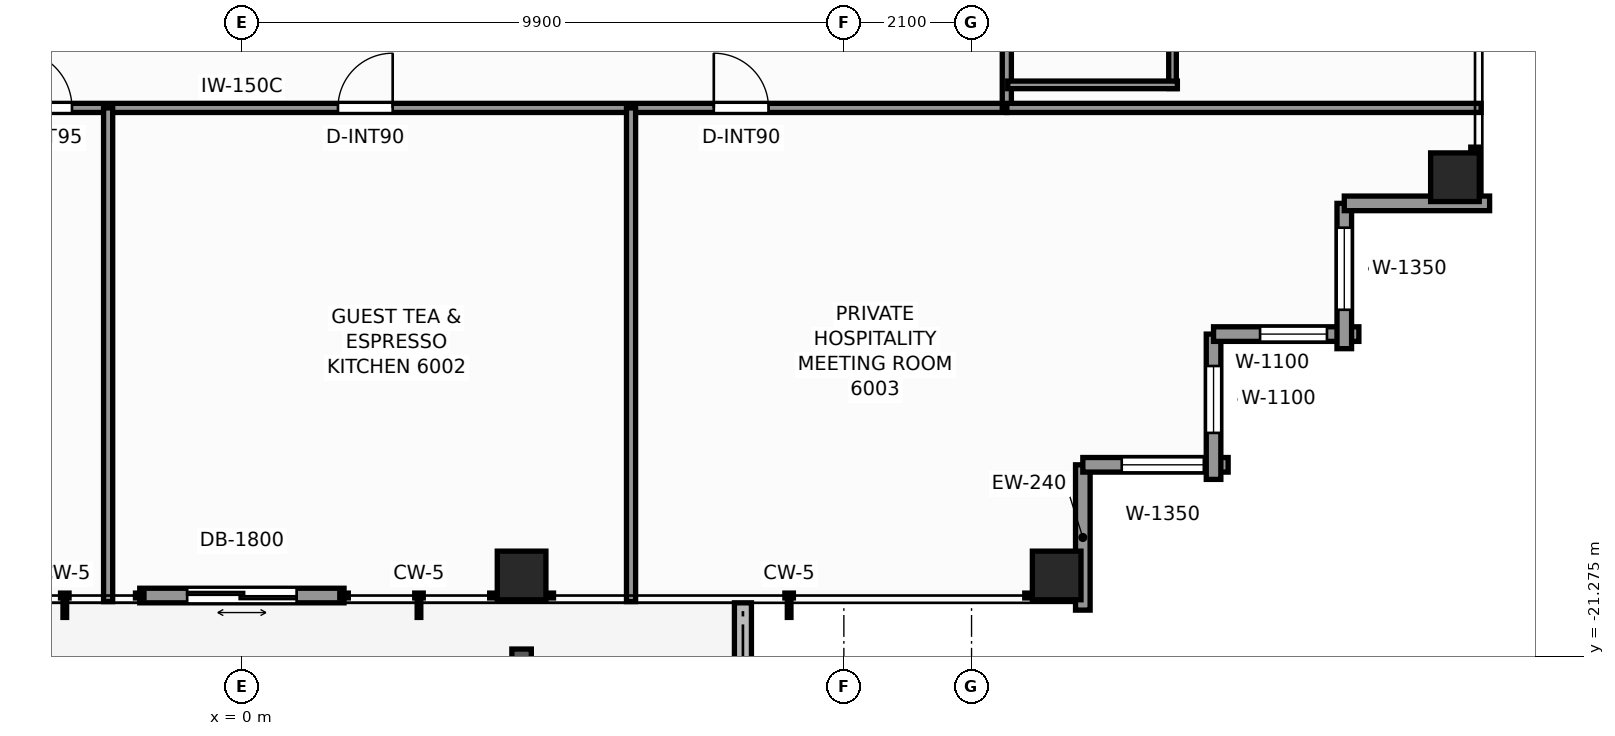
"""IFC4 building model, lengths in metres.
Left out: names, types, materials, properties, quantities, classifications, styles, units other than length and angle.
Written with IfcOpenShell. Run it as: python <this file> out.ifc"""

import sys

from ifc_helpers import new_model, si_unit, direction, frame, frame_2d, origin, origin_2d, place, context, subcontext, project, spatial, rectangle, extrude, element, fill, save


model = new_model("IFC4")
c1 = context("Model", 3, precision=1e-05, world=origin(), true_north=direction((0.0, 1.0)))
c2 = subcontext(c1, "Body", "Model", "MODEL_VIEW")
j1 = project(units=[si_unit("LENGTHUNIT", "METRE"), si_unit("PLANEANGLEUNIT", "RADIAN")], contexts=[c1])
p1 = place(None, origin())
s1 = spatial("IfcSite", under=j1, at=p1, CompositionType="ELEMENT")
p2 = place(p1, origin())
s2 = spatial("IfcBuilding", under=s1, at=p2, CompositionType="ELEMENT")
p3 = place(p2, frame((0.0, 0.0, 206.4)))
s3 = spatial("IfcBuildingStorey", under=s2, at=p3, CompositionType="ELEMENT", Elevation=206.4)
for number, where, z_axis, x_axis in (
    (1, (4.6, -19.95, 0.0), (0.0, 0.0, 1.0), (1.0, 0.0, 0.0)),
    (2, (13.4, -19.95, 0.0), (0.0, 0.0, 1.0), (1.0, 0.0, 0.0)),
    (3, (19.95, -13.4, 0.0), (0.0, 0.0, 1.0), (1.0, 0.0, 0.0)),
):
    element("IfcColumn", number, at=place(p3, frame(where, z_axis=z_axis, x_axis=x_axis)), inside=s3, PredefinedType="COLUMN", context=c2, shape_type="SweptSolid", body=[
        extrude(rectangle(XDim=0.8, YDim=0.8, at=origin_2d()), origin(), (0.0, 0.0, 1.0), 3.3),
    ])
p4 = place(p3, frame((8.24, -23.074, -0.04), z_axis=(0.0, 0.0, 1.0), x_axis=(0.0, 1.0, 0.0)))
e4 = element("IfcWall", 4, at=p4, inside=s3, PredefinedType="PARAPET", context=c2, shape_type="SweptSolid", body=[
    extrude(rectangle(XDim=2.674, YDim=0.28, at=frame_2d((1.337, 0.0))), origin(), (0.0, 0.0, 1.0), 0.42),
])
p5 = place(p3, frame((1.68, -20.28, 0.0), z_axis=(0.0, 0.0, 1.0), x_axis=(-1.0, 0.0, 0.0)))
e5 = element("IfcWall", 5, at=p5, inside=s3, PredefinedType="STANDARD", context=c2, shape_type="SweptSolid", body=[
    extrude(rectangle(XDim=3.36, YDim=0.24, at=frame_2d((1.68, 0.0))), origin(), (0.0, 0.0, 1.0), 3.08),
])
p6 = place(p5, frame((0.78, 0.0, 0.0)))
e6 = element("IfcOpeningElement", 6, at=p6, cuts=e5, PredefinedType="OPENING", context=c2, shape_type="SweptSolid", body=[
    extrude(rectangle(XDim=1.8, YDim=2.2, at=frame_2d((0.9, 1.1))), frame((0.0, 0.13, 0.0), z_axis=(0.0, -1.0, 0.0), x_axis=(1.0, 0.0, 0.0)), (0.0, 0.0, 1.0), 0.26),
])
p7 = place(p3, frame((13.83, -18.13, 0.0), z_axis=(0.0, 0.0, 1.0), x_axis=(0.0, -1.0, 0.0)))
e7 = element("IfcWall", 7, at=p7, inside=s3, PredefinedType="STANDARD", context=c2, shape_type="SweptSolid", body=[
    extrude(rectangle(XDim=2.39, YDim=0.24, at=frame_2d((1.195, 0.0))), origin(), (0.0, 0.0, 1.0), 2.463),
])
p8 = place(p3, frame((16.22, -18.13, 0.0), z_axis=(0.0, 0.0, 1.0), x_axis=(-1.0, 0.0, 0.0)))
e8 = element("IfcWall", 8, at=p8, inside=s3, PredefinedType="STANDARD", context=c2, shape_type="SweptSolid", body=[
    extrude(rectangle(XDim=2.39, YDim=0.24, at=frame_2d((1.195, 0.0))), origin(), (0.0, 0.0, 1.0), 2.463),
])
p9 = place(p8, frame((0.4, 0.0, 0.65)))
e9 = element("IfcOpeningElement", 9, at=p9, cuts=e8, PredefinedType="OPENING", context=c2, shape_type="SweptSolid", body=[
    extrude(rectangle(XDim=1.35, YDim=1.55, at=frame_2d((0.675, 0.775))), frame((0.0, 0.13, 0.0), z_axis=(0.0, -1.0, 0.0), x_axis=(1.0, 0.0, 0.0)), (0.0, 0.0, 1.0), 0.26),
])
p10 = place(p3, frame((15.98, -15.98, 0.0), z_axis=(0.0, 0.0, 1.0), x_axis=(0.0, -1.0, 0.0)))
e10 = element("IfcWall", 10, at=p10, inside=s3, PredefinedType="STANDARD", context=c2, shape_type="SweptSolid", body=[
    extrude(rectangle(XDim=2.39, YDim=0.24, at=frame_2d((1.195, 0.0))), origin(), (0.0, 0.0, 1.0), 2.463),
])
p11 = place(p10, frame((0.525, 0.0, 0.65)))
e11 = element("IfcOpeningElement", 11, at=p11, cuts=e10, PredefinedType="OPENING", context=c2, shape_type="SweptSolid", body=[
    extrude(rectangle(XDim=1.1, YDim=1.45, at=frame_2d((0.55, 0.725))), frame((0.0, 0.13, 0.0), z_axis=(0.0, -1.0, 0.0), x_axis=(1.0, 0.0, 0.0)), (0.0, 0.0, 1.0), 0.26),
])
p12 = place(p3, frame((18.37, -15.98, 0.0), z_axis=(0.0, 0.0, 1.0), x_axis=(-1.0, 0.0, 0.0)))
e12 = element("IfcWall", 12, at=p12, inside=s3, PredefinedType="STANDARD", context=c2, shape_type="SweptSolid", body=[
    extrude(rectangle(XDim=2.39, YDim=0.24, at=frame_2d((1.195, 0.0))), origin(), (0.0, 0.0, 1.0), 2.463),
])
p13 = place(p12, frame((0.525, 0.0, 0.65)))
e13 = element("IfcOpeningElement", 13, at=p13, cuts=e12, PredefinedType="OPENING", context=c2, shape_type="SweptSolid", body=[
    extrude(rectangle(XDim=1.1, YDim=1.45, at=frame_2d((0.55, 0.725))), frame((0.0, 0.13, 0.0), z_axis=(0.0, -1.0, 0.0), x_axis=(1.0, 0.0, 0.0)), (0.0, 0.0, 1.0), 0.26),
])
p14 = place(p3, frame((18.13, -13.83, 0.0), z_axis=(0.0, 0.0, 1.0), x_axis=(0.0, -1.0, 0.0)))
e14 = element("IfcWall", 14, at=p14, inside=s3, PredefinedType="STANDARD", context=c2, shape_type="SweptSolid", body=[
    extrude(rectangle(XDim=2.39, YDim=0.24, at=frame_2d((1.195, 0.0))), origin(), (0.0, 0.0, 1.0), 2.463),
])
p15 = place(p14, frame((0.4, 0.0, 0.65)))
e15 = element("IfcOpeningElement", 15, at=p15, cuts=e14, PredefinedType="OPENING", context=c2, shape_type="SweptSolid", body=[
    extrude(rectangle(XDim=1.35, YDim=1.55, at=frame_2d((0.675, 0.775))), frame((0.0, 0.13, 0.0), z_axis=(0.0, -1.0, 0.0), x_axis=(1.0, 0.0, 0.0)), (0.0, 0.0, 1.0), 0.26),
])
p16 = place(p3, frame((20.52, -13.83, 0.0), z_axis=(0.0, 0.0, 1.0), x_axis=(-1.0, 0.0, 0.0)))
e16 = element("IfcWall", 16, at=p16, inside=s3, PredefinedType="STANDARD", context=c2, shape_type="SweptSolid", body=[
    extrude(rectangle(XDim=2.39, YDim=0.24, at=frame_2d((1.195, 0.0))), origin(), (0.0, 0.0, 1.0), 2.463),
])
p17 = place(p3, frame((-12.58, -12.26, 0.0), z_axis=(0.0, 0.0, 1.0), x_axis=(1.0, 0.0, 0.0)))
e17 = element("IfcWall", 17, at=p17, inside=s3, PredefinedType="PARTITIONING", context=c2, shape_type="SweptSolid", body=[
    extrude(rectangle(XDim=25.16, YDim=0.15, at=frame_2d((12.58, 0.0))), origin(), (0.0, 0.0, 1.0), 2.369),
])
p18 = place(p17, frame((3.657, 0.0, 0.0)))
e18 = element("IfcOpeningElement", 18, at=p18, cuts=e17, PredefinedType="OPENING", context=c2, shape_type="SweptSolid", body=[
    extrude(rectangle(XDim=0.9, YDim=2.06, at=frame_2d((0.45, 1.03))), frame((0.0, 0.085, 0.0), z_axis=(0.0, -1.0, 0.0), x_axis=(1.0, 0.0, 0.0)), (0.0, 0.0, 1.0), 0.17),
])
p19 = place(p17, frame((6.082, 0.0, 0.0)))
e19 = element("IfcOpeningElement", 19, at=p19, cuts=e17, PredefinedType="OPENING", context=c2, shape_type="SweptSolid", body=[
    extrude(rectangle(XDim=0.9, YDim=2.06, at=frame_2d((0.45, 1.03))), frame((0.0, 0.085, 0.0), z_axis=(0.0, -1.0, 0.0), x_axis=(1.0, 0.0, 0.0)), (0.0, 0.0, 1.0), 0.17),
])
p20 = place(p17, frame((8.836, 0.0, 0.0)))
e20 = element("IfcOpeningElement", 20, at=p20, cuts=e17, PredefinedType="OPENING", context=c2, shape_type="SweptSolid", body=[
    extrude(rectangle(XDim=0.95, YDim=2.06, at=frame_2d((0.475, 1.03))), frame((0.0, 0.085, 0.0), z_axis=(0.0, -1.0, 0.0), x_axis=(1.0, 0.0, 0.0)), (0.0, 0.0, 1.0), 0.17),
])
p21 = place(p17, frame((14.16, 0.0, 0.0)))
e21 = element("IfcOpeningElement", 21, at=p21, cuts=e17, PredefinedType="OPENING", context=c2, shape_type="SweptSolid", body=[
    extrude(rectangle(XDim=0.9, YDim=2.06, at=frame_2d((0.45, 1.03))), frame((0.0, 0.085, 0.0), z_axis=(0.0, -1.0, 0.0), x_axis=(1.0, 0.0, 0.0)), (0.0, 0.0, 1.0), 0.17),
])
p22 = place(p17, frame((20.341, 0.0, 0.0)))
e22 = element("IfcOpeningElement", 22, at=p22, cuts=e17, PredefinedType="OPENING", context=c2, shape_type="SweptSolid", body=[
    extrude(rectangle(XDim=0.9, YDim=2.06, at=frame_2d((0.45, 1.03))), frame((0.0, 0.085, 0.0), z_axis=(0.0, -1.0, 0.0), x_axis=(1.0, 0.0, 0.0)), (0.0, 0.0, 1.0), 0.17),
])
p23 = place(p3, frame((12.58, -12.26, 0.0), z_axis=(0.0, 0.0, 1.0), x_axis=(0.0, 1.0, 0.0)))
e23 = element("IfcWall", 23, at=p23, inside=s3, PredefinedType="PARTITIONING", context=c2, shape_type="SweptSolid", body=[
    extrude(rectangle(XDim=24.84, YDim=0.15, at=frame_2d((12.42, 0.0))), origin(), (0.0, 0.0, 1.0), 2.369),
])
p24 = place(p23, frame((3.373, 0.0, 0.0)))
e24 = element("IfcOpeningElement", 24, at=p24, cuts=e23, PredefinedType="OPENING", context=c2, shape_type="SweptSolid", body=[
    extrude(rectangle(XDim=0.95, YDim=2.06, at=frame_2d((0.475, 1.03))), frame((0.0, 0.085, 0.0), z_axis=(0.0, -1.0, 0.0), x_axis=(1.0, 0.0, 0.0)), (0.0, 0.0, 1.0), 0.17),
])
p25 = place(p23, frame((5.538, 0.0, 0.0)))
e25 = element("IfcOpeningElement", 25, at=p25, cuts=e23, PredefinedType="OPENING", context=c2, shape_type="SweptSolid", body=[
    extrude(rectangle(XDim=0.9, YDim=2.06, at=frame_2d((0.45, 1.03))), frame((0.0, 0.085, 0.0), z_axis=(0.0, -1.0, 0.0), x_axis=(1.0, 0.0, 0.0)), (0.0, 0.0, 1.0), 0.17),
])
p26 = place(p23, frame((13.318, 0.0, 0.0)))
e26 = element("IfcOpeningElement", 26, at=p26, cuts=e23, PredefinedType="OPENING", context=c2, shape_type="SweptSolid", body=[
    extrude(rectangle(XDim=0.95, YDim=2.06, at=frame_2d((0.475, 1.03))), frame((0.0, 0.085, 0.0), z_axis=(0.0, -1.0, 0.0), x_axis=(1.0, 0.0, 0.0)), (0.0, 0.0, 1.0), 0.17),
])
p27 = place(p23, frame((17.724, 0.0, 0.0)))
e27 = element("IfcOpeningElement", 27, at=p27, cuts=e23, PredefinedType="OPENING", context=c2, shape_type="SweptSolid", body=[
    extrude(rectangle(XDim=0.9, YDim=2.06, at=frame_2d((0.45, 1.03))), frame((0.0, 0.085, 0.0), z_axis=(0.0, -1.0, 0.0), x_axis=(1.0, 0.0, 0.0)), (0.0, 0.0, 1.0), 0.17),
])
p28 = place(p23, frame((20.0, 0.0, 0.0)))
e28 = element("IfcOpeningElement", 28, at=p28, cuts=e23, PredefinedType="OPENING", context=c2, shape_type="SweptSolid", body=[
    extrude(rectangle(XDim=0.95, YDim=2.06, at=frame_2d((0.475, 1.03))), frame((0.0, 0.085, 0.0), z_axis=(0.0, -1.0, 0.0), x_axis=(1.0, 0.0, 0.0)), (0.0, 0.0, 1.0), 0.17),
])
p29 = place(p3, frame((12.58, -12.26, 0.0), z_axis=(0.0, 0.0, 1.0), x_axis=(1.0, 0.0, 0.0)))
e29 = element("IfcWall", 29, at=p29, inside=s3, PredefinedType="PARTITIONING", context=c2, shape_type="SweptSolid", body=[
    extrude(rectangle(XDim=7.8, YDim=0.15, at=frame_2d((3.9, 0.0))), origin(), (0.0, 0.0, 1.0), 2.369),
])
for number, where, z_axis, x_axis in (
    (30, (-2.2, -20.38, 0.0), (0.0, 0.0, 1.0), (0.0, 1.0, 0.0)),
    (31, (6.4, -20.38, 0.0), (0.0, 0.0, 1.0), (0.0, 1.0, 0.0)),
):
    element("IfcWall", number, at=place(p3, frame(where, z_axis=z_axis, x_axis=x_axis)), inside=s3, PredefinedType="PARTITIONING", context=c2, shape_type="SweptSolid", body=[
        extrude(rectangle(XDim=8.12, YDim=0.15, at=frame_2d((4.06, 0.0))), origin(), (0.0, 0.0, 1.0), 2.453),
    ])
p30 = place(p3, frame((15.305, -11.941, 0.0), z_axis=(0.0, 0.0, 1.0), x_axis=(0.0, 1.0, 0.0)))
e32 = element("IfcWall", 32, at=p30, inside=s3, PredefinedType="PARTITIONING", context=c2, shape_type="SweptSolid", body=[
    extrude(rectangle(XDim=2.37, YDim=0.125, at=frame_2d((1.185, 0.0))), origin(), (0.0, 0.0, 1.0), 2.369),
])
p31 = place(p3, frame((12.595, -11.881, 0.0), z_axis=(0.0, 0.0, 1.0), x_axis=(1.0, 0.0, 0.0)))
e33 = element("IfcWall", 33, at=p31, inside=s3, PredefinedType="PARTITIONING", context=c2, shape_type="SweptSolid", body=[
    extrude(rectangle(XDim=2.79, YDim=0.125, at=frame_2d((1.395, 0.0))), origin(), (0.0, 0.0, 1.0), 2.369),
])
p32 = place(p6, origin())
e34 = element("IfcDoor", 34, at=p32, inside=s3, OperationType="DOUBLE_DOOR_SLIDING", PredefinedType="DOOR", context=c2, shape_type="SweptSolid", body=[
    extrude(rectangle(XDim=1.8, YDim=2.2, at=frame_2d((0.9, 1.1))), frame((0.0, 0.025, 0.0), z_axis=(0.0, -1.0, 0.0), x_axis=(1.0, 0.0, 0.0)), (0.0, 0.0, 1.0), 0.05),
])
fill(e6, e34)
p33 = place(p9, origin())
e35 = element("IfcWindow", 35, at=p33, inside=s3, PartitioningType="SINGLE_PANEL", PredefinedType="WINDOW", context=c2, shape_type="SweptSolid", body=[
    extrude(rectangle(XDim=1.35, YDim=1.55, at=frame_2d((0.675, 0.775))), frame((0.0, 0.03, 0.0), z_axis=(0.0, -1.0, 0.0), x_axis=(1.0, 0.0, 0.0)), (0.0, 0.0, 1.0), 0.06),
])
fill(e9, e35)
p34 = place(p11, origin())
e36 = element("IfcWindow", 36, at=p34, inside=s3, PartitioningType="SINGLE_PANEL", PredefinedType="WINDOW", context=c2, shape_type="SweptSolid", body=[
    extrude(rectangle(XDim=1.1, YDim=1.45, at=frame_2d((0.55, 0.725))), frame((0.0, 0.03, 0.0), z_axis=(0.0, -1.0, 0.0), x_axis=(1.0, 0.0, 0.0)), (0.0, 0.0, 1.0), 0.06),
])
fill(e11, e36)
p35 = place(p13, origin())
e37 = element("IfcWindow", 37, at=p35, inside=s3, PartitioningType="SINGLE_PANEL", PredefinedType="WINDOW", context=c2, shape_type="SweptSolid", body=[
    extrude(rectangle(XDim=1.1, YDim=1.45, at=frame_2d((0.55, 0.725))), frame((0.0, 0.03, 0.0), z_axis=(0.0, -1.0, 0.0), x_axis=(1.0, 0.0, 0.0)), (0.0, 0.0, 1.0), 0.06),
])
fill(e13, e37)
p36 = place(p15, origin())
e38 = element("IfcWindow", 38, at=p36, inside=s3, PartitioningType="SINGLE_PANEL", PredefinedType="WINDOW", context=c2, shape_type="SweptSolid", body=[
    extrude(rectangle(XDim=1.35, YDim=1.55, at=frame_2d((0.675, 0.775))), frame((0.0, 0.03, 0.0), z_axis=(0.0, -1.0, 0.0), x_axis=(1.0, 0.0, 0.0)), (0.0, 0.0, 1.0), 0.06),
])
fill(e15, e38)
p37 = place(p20, origin())
e39 = element("IfcDoor", 39, at=p37, inside=s3, OperationType="SINGLE_SWING_LEFT", PredefinedType="DOOR", context=c2, shape_type="SweptSolid", body=[
    extrude(rectangle(XDim=0.95, YDim=2.06, at=frame_2d((0.475, 1.03))), frame((0.0, 0.025, 0.0), z_axis=(0.0, -1.0, 0.0), x_axis=(1.0, 0.0, 0.0)), (0.0, 0.0, 1.0), 0.05),
])
fill(e20, e39)
p38 = place(p21, origin())
e40 = element("IfcDoor", 40, at=p38, inside=s3, OperationType="SINGLE_SWING_RIGHT", PredefinedType="DOOR", context=c2, shape_type="SweptSolid", body=[
    extrude(rectangle(XDim=0.9, YDim=2.06, at=frame_2d((0.45, 1.03))), frame((0.0, 0.025, 0.0), z_axis=(0.0, -1.0, 0.0), x_axis=(1.0, 0.0, 0.0)), (0.0, 0.0, 1.0), 0.05),
])
fill(e21, e40)
p39 = place(p22, origin())
e41 = element("IfcDoor", 41, at=p39, inside=s3, OperationType="SINGLE_SWING_LEFT", PredefinedType="DOOR", context=c2, shape_type="SweptSolid", body=[
    extrude(rectangle(XDim=0.9, YDim=2.06, at=frame_2d((0.45, 1.03))), frame((0.0, 0.025, 0.0), z_axis=(0.0, -1.0, 0.0), x_axis=(1.0, 0.0, 0.0)), (0.0, 0.0, 1.0), 0.05),
])
fill(e22, e41)
save(model, sys.argv[1])
